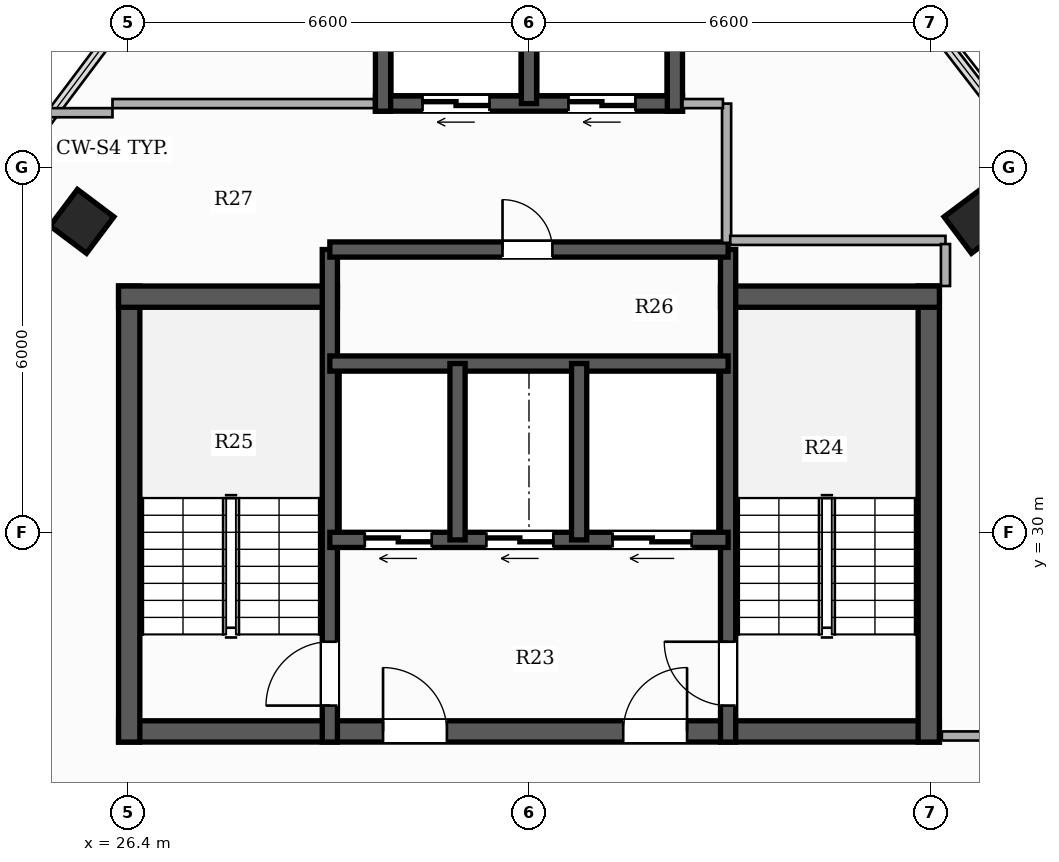
"""IFC4 building model, lengths in metres.
Left out: names, types, materials, properties, quantities, classifications, styles, units other than length and angle.
Written with IfcOpenShell. Run it as: python <this file> out.ifc"""

import sys

from ifc_helpers import new_model, si_unit, direction, frame, frame_2d, origin, origin_2d, place, context, subcontext, project, spatial, rectangle, hollow_rectangle, extrude, element, fill, save


model = new_model("IFC4")
c1 = context("Model", 3, precision=1e-05, world=origin(), true_north=direction((0.0, 1.0)))
c2 = subcontext(c1, "Body", "Model", "MODEL_VIEW")
j1 = project(units=[si_unit("LENGTHUNIT", "METRE"), si_unit("PLANEANGLEUNIT", "RADIAN")], contexts=[c1])
p1 = place(None, origin())
s1 = spatial("IfcSite", under=j1, at=p1, CompositionType="ELEMENT")
p2 = place(p1, origin())
s2 = spatial("IfcBuilding", under=s1, at=p2, CompositionType="ELEMENT")
p3 = place(p2, frame((0.0, 0.0, 253.55)))
s3 = spatial("IfcBuildingStorey", under=s2, at=p3, CompositionType="ELEMENT", Elevation=253.55)
p4 = place(p3, frame((26.25, 26.725, 0.0), z_axis=(0.0, 0.0, 1.0), x_axis=(1.0, 0.0, 0.0)))
e1 = element("IfcWall", 1, at=p4, inside=s3, PredefinedType="SHEAR", context=c2, shape_type="SweptSolid", body=[
    extrude(rectangle(XDim=13.5, YDim=0.35, at=frame_2d((6.75, 0.0))), origin(), (0.0, 0.0, 1.0), 3.3),
])
p5 = place(p4, frame((4.35, 0.0, 0.0)))
e2 = element("IfcOpeningElement", 2, at=p5, cuts=e1, PredefinedType="OPENING", context=c2, shape_type="SweptSolid", body=[
    extrude(rectangle(XDim=1.05, YDim=2.15, at=frame_2d((0.525, 1.075))), frame((0.0, 0.185, 0.0), z_axis=(0.0, -1.0, 0.0), x_axis=(1.0, 0.0, 0.0)), (0.0, 0.0, 1.0), 0.37),
])
p6 = place(p4, frame((8.3, 0.0, 0.0)))
e3 = element("IfcOpeningElement", 3, at=p6, cuts=e1, PredefinedType="OPENING", context=c2, shape_type="SweptSolid", body=[
    extrude(rectangle(XDim=1.05, YDim=2.15, at=frame_2d((0.525, 1.075))), frame((0.0, 0.185, 0.0), z_axis=(0.0, -1.0, 0.0), x_axis=(1.0, 0.0, 0.0)), (0.0, 0.0, 1.0), 0.37),
])
p7 = place(p3, frame((26.425, 26.55, 0.0), z_axis=(0.0, 0.0, 1.0), x_axis=(0.0, 1.0, 0.0)))
e4 = element("IfcWall", 4, at=p7, inside=s3, PredefinedType="SHEAR", context=c2, shape_type="SweptSolid", body=[
    extrude(rectangle(XDim=7.5, YDim=0.35, at=frame_2d((3.75, 0.0))), origin(), (0.0, 0.0, 1.0), 3.3),
])
p8 = place(p3, frame((26.25, 33.875, 0.0), z_axis=(0.0, 0.0, 1.0), x_axis=(1.0, 0.0, 0.0)))
e5 = element("IfcWall", 5, at=p8, inside=s3, PredefinedType="SHEAR", context=c2, shape_type="SweptSolid", body=[
    extrude(rectangle(XDim=3.6, YDim=0.35, at=frame_2d((1.8, 0.0))), origin(), (0.0, 0.0, 1.0), 3.3),
])
p9 = place(p3, frame((39.575, 26.55, 0.0), z_axis=(0.0, 0.0, 1.0), x_axis=(0.0, 1.0, 0.0)))
e6 = element("IfcWall", 6, at=p9, inside=s3, PredefinedType="SHEAR", context=c2, shape_type="SweptSolid", body=[
    extrude(rectangle(XDim=7.5, YDim=0.35, at=frame_2d((3.75, 0.0))), origin(), (0.0, 0.0, 1.0), 3.3),
])
p10 = place(p3, frame((36.15, 33.875, 0.0), z_axis=(0.0, 0.0, 1.0), x_axis=(1.0, 0.0, 0.0)))
e7 = element("IfcWall", 7, at=p10, inside=s3, PredefinedType="SHEAR", context=c2, shape_type="SweptSolid", body=[
    extrude(rectangle(XDim=3.6, YDim=0.35, at=frame_2d((1.8, 0.0))), origin(), (0.0, 0.0, 1.0), 3.3),
])
p11 = place(p3, frame((29.725, 26.55, 0.0), z_axis=(0.0, 0.0, 1.0), x_axis=(0.0, 1.0, 0.0)))
e8 = element("IfcWall", 8, at=p11, inside=s3, PredefinedType="SHEAR", context=c2, shape_type="SweptSolid", body=[
    extrude(rectangle(XDim=8.1, YDim=0.25, at=frame_2d((4.05, 0.0))), origin(), (0.0, 0.0, 1.0), 3.3),
])
p12 = place(p11, frame((0.6, 0.0, 0.0)))
e9 = element("IfcOpeningElement", 9, at=p12, cuts=e8, PredefinedType="OPENING", context=c2, shape_type="SweptSolid", body=[
    extrude(rectangle(XDim=1.05, YDim=2.15, at=frame_2d((0.525, 1.075))), frame((0.0, 0.135, 0.0), z_axis=(0.0, -1.0, 0.0), x_axis=(1.0, 0.0, 0.0)), (0.0, 0.0, 1.0), 0.27),
])
p13 = place(p3, frame((36.275, 26.55, 0.0), z_axis=(0.0, 0.0, 1.0), x_axis=(0.0, 1.0, 0.0)))
e10 = element("IfcWall", 10, at=p13, inside=s3, PredefinedType="SHEAR", context=c2, shape_type="SweptSolid", body=[
    extrude(rectangle(XDim=8.1, YDim=0.25, at=frame_2d((4.05, 0.0))), origin(), (0.0, 0.0, 1.0), 3.3),
])
p14 = place(p13, frame((0.6, 0.0, 0.0)))
e11 = element("IfcOpeningElement", 11, at=p14, cuts=e10, PredefinedType="OPENING", context=c2, shape_type="SweptSolid", body=[
    extrude(rectangle(XDim=1.05, YDim=2.15, at=frame_2d((0.525, 1.075))), frame((0.0, 0.135, 0.0), z_axis=(0.0, -1.0, 0.0), x_axis=(1.0, 0.0, 0.0)), (0.0, 0.0, 1.0), 0.27),
])
p15 = place(p3, frame((36.275, 29.875, 0.0), z_axis=(0.0, 0.0, 1.0), x_axis=(-1.0, 0.0, 0.0)))
e12 = element("IfcWall", 12, at=p15, inside=s3, PredefinedType="SHEAR", context=c2, shape_type="SweptSolid", body=[
    extrude(rectangle(XDim=6.55, YDim=0.25, at=frame_2d((3.275, 0.0))), origin(), (0.0, 0.0, 1.0), 3.3),
])
p16 = place(p15, frame((4.875, 0.0, 0.0)))
e13 = element("IfcOpeningElement", 13, at=p16, cuts=e12, PredefinedType="OPENING", context=c2, shape_type="SweptSolid", body=[
    extrude(rectangle(XDim=1.1, YDim=2.2, at=frame_2d((0.55, 1.1))), frame((0.0, 0.135, 0.0), z_axis=(0.0, -1.0, 0.0), x_axis=(1.0, 0.0, 0.0)), (0.0, 0.0, 1.0), 0.27),
])
p17 = place(p15, frame((2.875, 0.0, 0.0)))
e14 = element("IfcOpeningElement", 14, at=p17, cuts=e12, PredefinedType="OPENING", context=c2, shape_type="SweptSolid", body=[
    extrude(rectangle(XDim=1.1, YDim=2.2, at=frame_2d((0.55, 1.1))), frame((0.0, 0.135, 0.0), z_axis=(0.0, -1.0, 0.0), x_axis=(1.0, 0.0, 0.0)), (0.0, 0.0, 1.0), 0.27),
])
p18 = place(p15, frame((0.6, 0.0, 0.0)))
e15 = element("IfcOpeningElement", 15, at=p18, cuts=e12, PredefinedType="OPENING", context=c2, shape_type="SweptSolid", body=[
    extrude(rectangle(XDim=1.3, YDim=2.2, at=frame_2d((0.65, 1.1))), frame((0.0, 0.135, 0.0), z_axis=(0.0, -1.0, 0.0), x_axis=(1.0, 0.0, 0.0)), (0.0, 0.0, 1.0), 0.27),
])
p19 = place(p3, frame((29.725, 32.775, 0.0), z_axis=(0.0, 0.0, 1.0), x_axis=(1.0, 0.0, 0.0)))
e16 = element("IfcWall", 16, at=p19, inside=s3, PredefinedType="SHEAR", context=c2, shape_type="SweptSolid", body=[
    extrude(rectangle(XDim=6.55, YDim=0.25, at=frame_2d((3.275, 0.0))), origin(), (0.0, 0.0, 1.0), 3.3),
])
for number, where, z_axis, x_axis in (
    (17, (31.825, 29.875, 0.0), (0.0, 0.0, 1.0), (0.0, 1.0, 0.0)),
    (18, (33.825, 29.875, 0.0), (0.0, 0.0, 1.0), (0.0, 1.0, 0.0)),
):
    element("IfcWall", number, at=place(p3, frame(where, z_axis=z_axis, x_axis=x_axis)), inside=s3, PredefinedType="SHEAR", context=c2, shape_type="SweptSolid", body=[
        extrude(rectangle(XDim=2.9, YDim=0.25, at=frame_2d((1.45, 0.0))), origin(), (0.0, 0.0, 1.0), 3.3),
    ])
p20 = place(p3, frame((29.725, 34.65, 0.0), z_axis=(0.0, 0.0, 1.0), x_axis=(1.0, 0.0, 0.0)))
e19 = element("IfcWall", 19, at=p20, inside=s3, PredefinedType="SHEAR", context=c2, shape_type="SweptSolid", body=[
    extrude(rectangle(XDim=6.55, YDim=0.25, at=frame_2d((3.275, 0.0))), origin(), (0.0, 0.0, 1.0), 3.3),
])
p21 = place(p20, frame((2.84, 0.0, 0.0)))
e20 = element("IfcOpeningElement", 20, at=p21, cuts=e19, PredefinedType="OPENING", context=c2, shape_type="SweptSolid", body=[
    extrude(rectangle(XDim=0.82, YDim=2.1, at=frame_2d((0.41, 1.05))), frame((0.0, 0.135, 0.0), z_axis=(0.0, -1.0, 0.0), x_axis=(1.0, 0.0, 0.0)), (0.0, 0.0, 1.0), 0.27),
])
p22 = place(p3, frame((35.525, 37.05, 0.0), z_axis=(0.0, 0.0, 1.0), x_axis=(-1.0, 0.0, 0.0)))
e21 = element("IfcWall", 21, at=p22, inside=s3, PredefinedType="SHEAR", context=c2, shape_type="SweptSolid", body=[
    extrude(rectangle(XDim=5.05, YDim=0.25, at=frame_2d((2.525, 0.0))), origin(), (0.0, 0.0, 1.0), 3.3),
])
p23 = place(p22, frame((3.175, 0.0, 0.0)))
e22 = element("IfcOpeningElement", 22, at=p23, cuts=e21, PredefinedType="OPENING", context=c2, shape_type="SweptSolid", body=[
    extrude(rectangle(XDim=1.1, YDim=2.2, at=frame_2d((0.55, 1.1))), frame((0.0, 0.135, 0.0), z_axis=(0.0, -1.0, 0.0), x_axis=(1.0, 0.0, 0.0)), (0.0, 0.0, 1.0), 0.27),
])
p24 = place(p22, frame((0.775, 0.0, 0.0)))
e23 = element("IfcOpeningElement", 23, at=p24, cuts=e21, PredefinedType="OPENING", context=c2, shape_type="SweptSolid", body=[
    extrude(rectangle(XDim=1.1, YDim=2.2, at=frame_2d((0.55, 1.1))), frame((0.0, 0.135, 0.0), z_axis=(0.0, -1.0, 0.0), x_axis=(1.0, 0.0, 0.0)), (0.0, 0.0, 1.0), 0.27),
])
for number, where, z_axis, x_axis in (
    (24, (30.6, 36.925, 0.0), (0.0, 0.0, 1.0), (0.0, 1.0, 0.0)),
    (25, (35.4, 36.925, 0.0), (0.0, 0.0, 1.0), (0.0, 1.0, 0.0)),
):
    element("IfcWall", number, at=place(p3, frame(where, z_axis=z_axis, x_axis=x_axis)), inside=s3, PredefinedType="SHEAR", context=c2, shape_type="SweptSolid", body=[
        extrude(rectangle(XDim=2.8, YDim=0.25, at=frame_2d((1.4, 0.0))), origin(), (0.0, 0.0, 1.0), 3.3),
    ])
p25 = place(p3, frame((33.0, 37.05, 0.0), z_axis=(0.0, 0.0, 1.0), x_axis=(0.0, 1.0, 0.0)))
e26 = element("IfcWall", 26, at=p25, inside=s3, PredefinedType="SHEAR", context=c2, shape_type="SweptSolid", body=[
    extrude(rectangle(XDim=2.55, YDim=0.25, at=frame_2d((1.275, 0.0))), origin(), (0.0, 0.0, 1.0), 3.3),
])
for number, where, z_axis, x_axis in (
    (27, (25.648, 35.113, 0.0), (0.0, 0.0, 1.0), (0.6, 0.8, 0.0)),
    (28, (40.352, 35.113, 0.0), (0.0, 0.0, 1.0), (-0.6, 0.8, 0.0)),
):
    element("IfcColumn", number, at=place(p3, frame(where, z_axis=z_axis, x_axis=x_axis)), inside=s3, PredefinedType="COLUMN", context=c2, shape_type="SweptSolid", body=[
        extrude(hollow_rectangle(XDim=0.75, YDim=0.75, WallThickness=0.025, at=origin_2d()), origin(), (0.0, 0.0, 1.0), 3.3),
    ])
p26 = place(p3, frame((36.25, 34.76, 0.0), z_axis=(0.0, 0.0, 1.0), x_axis=(0.0, 1.0, 0.0)))
e29 = element("IfcWall", 29, at=p26, inside=s3, PredefinedType="PARTITIONING", context=c2, shape_type="SweptSolid", body=[
    extrude(rectangle(XDim=2.29, YDim=0.15, at=frame_2d((1.145, 0.0))), origin(), (0.0, 0.0, 1.0), 2.265),
])
p27 = place(p3, frame((35.525, 37.05, 0.0), z_axis=(0.0, 0.0, 1.0), x_axis=(1.0, 0.0, 0.0)))
e30 = element("IfcWall", 30, at=p27, inside=s3, PredefinedType="PARTITIONING", context=c2, shape_type="SweptSolid", body=[
    extrude(rectangle(XDim=0.665, YDim=0.15, at=frame_2d((0.333, 0.0))), origin(), (0.0, 0.0, 1.0), 2.265),
])
p28 = place(p3, frame((25.058, 36.9, 0.0), z_axis=(0.0, 0.0, 1.0), x_axis=(1.0, 0.0, 0.0)))
e31 = element("IfcWall", 31, at=p28, inside=s3, PredefinedType="PARTITIONING", context=c2, shape_type="SweptSolid", body=[
    extrude(rectangle(XDim=1.092, YDim=0.15, at=frame_2d((0.546, 0.0))), origin(), (0.0, 0.0, 1.0), 2.9),
])
p29 = place(p3, frame((39.79, 26.65, 0.0), z_axis=(0.0, 0.0, 1.0), x_axis=(1.0, 0.0, 0.0)))
e32 = element("IfcWall", 32, at=p29, inside=s3, PredefinedType="PARTITIONING", context=c2, shape_type="SweptSolid", body=[
    extrude(rectangle(XDim=2.46, YDim=0.15, at=frame_2d((1.23, 0.0))), origin(), (0.0, 0.0, 1.0), 2.405),
])
p30 = place(p3, frame((26.15, 37.05, 0.0), z_axis=(0.0, 0.0, 1.0), x_axis=(1.0, 0.0, 0.0)))
e33 = element("IfcWall", 33, at=p30, inside=s3, PredefinedType="PARTITIONING", context=c2, shape_type="SweptSolid", body=[
    extrude(rectangle(XDim=4.3, YDim=0.15, at=frame_2d((2.15, 0.0))), origin(), (0.0, 0.0, 1.0), 2.265),
])
p31 = place(p3, frame((36.31, 34.8, 0.0), z_axis=(0.0, 0.0, 1.0), x_axis=(1.0, 0.0, 0.0)))
e34 = element("IfcWall", 34, at=p31, inside=s3, PredefinedType="PARTITIONING", context=c2, shape_type="SweptSolid", body=[
    extrude(rectangle(XDim=3.54, YDim=0.15, at=frame_2d((1.77, 0.0))), origin(), (0.0, 0.0, 1.0), 2.265),
])
p32 = place(p3, frame((39.85, 34.74, 0.0), z_axis=(0.0, 0.0, 1.0), x_axis=(0.0, -1.0, 0.0)))
e35 = element("IfcWall", 35, at=p32, inside=s3, PredefinedType="PARTITIONING", context=c2, shape_type="SweptSolid", body=[
    extrude(rectangle(XDim=0.69, YDim=0.15, at=frame_2d((0.345, 0.0))), origin(), (0.0, 0.0, 1.0), 2.613),
])
p33 = place(p12, origin())
e36 = element("IfcDoor", 36, at=p33, inside=s3, OperationType="SINGLE_SWING_LEFT", PredefinedType="DOOR", context=c2, shape_type="SweptSolid", body=[
    extrude(rectangle(XDim=1.05, YDim=2.15, at=frame_2d((0.525, 1.075))), frame((0.0, 0.025, 0.0), z_axis=(0.0, -1.0, 0.0), x_axis=(1.0, 0.0, 0.0)), (0.0, 0.0, 1.0), 0.05),
])
fill(e9, e36)
p34 = place(p14, origin())
e37 = element("IfcDoor", 37, at=p34, inside=s3, OperationType="SINGLE_SWING_RIGHT", PredefinedType="DOOR", context=c2, shape_type="SweptSolid", body=[
    extrude(rectangle(XDim=1.05, YDim=2.15, at=frame_2d((0.525, 1.075))), frame((0.0, 0.025, 0.0), z_axis=(0.0, -1.0, 0.0), x_axis=(1.0, 0.0, 0.0)), (0.0, 0.0, 1.0), 0.05),
])
fill(e11, e37)
p35 = place(p5, origin())
e38 = element("IfcDoor", 38, at=p35, inside=s3, OperationType="SINGLE_SWING_LEFT", PredefinedType="DOOR", context=c2, shape_type="SweptSolid", body=[
    extrude(rectangle(XDim=1.05, YDim=2.15, at=frame_2d((0.525, 1.075))), frame((0.0, 0.025, 0.0), z_axis=(0.0, -1.0, 0.0), x_axis=(1.0, 0.0, 0.0)), (0.0, 0.0, 1.0), 0.05),
])
fill(e2, e38)
p36 = place(p6, origin())
e39 = element("IfcDoor", 39, at=p36, inside=s3, OperationType="SINGLE_SWING_RIGHT", PredefinedType="DOOR", context=c2, shape_type="SweptSolid", body=[
    extrude(rectangle(XDim=1.05, YDim=2.15, at=frame_2d((0.525, 1.075))), frame((0.0, 0.025, 0.0), z_axis=(0.0, -1.0, 0.0), x_axis=(1.0, 0.0, 0.0)), (0.0, 0.0, 1.0), 0.05),
])
fill(e3, e39)
p37 = place(p16, origin())
e40 = element("IfcDoor", 40, at=p37, inside=s3, OperationType="DOUBLE_DOOR_SLIDING", PredefinedType="DOOR", context=c2, shape_type="SweptSolid", body=[
    extrude(rectangle(XDim=1.1, YDim=2.2, at=frame_2d((0.55, 1.1))), frame((0.0, 0.025, 0.0), z_axis=(0.0, -1.0, 0.0), x_axis=(1.0, 0.0, 0.0)), (0.0, 0.0, 1.0), 0.05),
])
fill(e13, e40)
p38 = place(p17, origin())
e41 = element("IfcDoor", 41, at=p38, inside=s3, OperationType="DOUBLE_DOOR_SLIDING", PredefinedType="DOOR", context=c2, shape_type="SweptSolid", body=[
    extrude(rectangle(XDim=1.1, YDim=2.2, at=frame_2d((0.55, 1.1))), frame((0.0, 0.025, 0.0), z_axis=(0.0, -1.0, 0.0), x_axis=(1.0, 0.0, 0.0)), (0.0, 0.0, 1.0), 0.05),
])
fill(e14, e41)
p39 = place(p18, origin())
e42 = element("IfcDoor", 42, at=p39, inside=s3, OperationType="DOUBLE_DOOR_SLIDING", PredefinedType="DOOR", context=c2, shape_type="SweptSolid", body=[
    extrude(rectangle(XDim=1.3, YDim=2.2, at=frame_2d((0.65, 1.1))), frame((0.0, 0.025, 0.0), z_axis=(0.0, -1.0, 0.0), x_axis=(1.0, 0.0, 0.0)), (0.0, 0.0, 1.0), 0.05),
])
fill(e15, e42)
p40 = place(p23, origin())
e43 = element("IfcDoor", 43, at=p40, inside=s3, OperationType="DOUBLE_DOOR_SLIDING", PredefinedType="DOOR", context=c2, shape_type="SweptSolid", body=[
    extrude(rectangle(XDim=1.1, YDim=2.2, at=frame_2d((0.55, 1.1))), frame((0.0, 0.025, 0.0), z_axis=(0.0, -1.0, 0.0), x_axis=(1.0, 0.0, 0.0)), (0.0, 0.0, 1.0), 0.05),
])
fill(e22, e43)
p41 = place(p24, origin())
e44 = element("IfcDoor", 44, at=p41, inside=s3, OperationType="DOUBLE_DOOR_SLIDING", PredefinedType="DOOR", context=c2, shape_type="SweptSolid", body=[
    extrude(rectangle(XDim=1.1, YDim=2.2, at=frame_2d((0.55, 1.1))), frame((0.0, 0.025, 0.0), z_axis=(0.0, -1.0, 0.0), x_axis=(1.0, 0.0, 0.0)), (0.0, 0.0, 1.0), 0.05),
])
fill(e23, e44)
p42 = place(p21, origin())
e45 = element("IfcDoor", 45, at=p42, inside=s3, OperationType="SINGLE_SWING_LEFT", PredefinedType="DOOR", context=c2, shape_type="SweptSolid", body=[
    extrude(rectangle(XDim=0.82, YDim=2.1, at=frame_2d((0.41, 1.05))), frame((0.0, 0.025, 0.0), z_axis=(0.0, -1.0, 0.0), x_axis=(1.0, 0.0, 0.0)), (0.0, 0.0, 1.0), 0.05),
])
fill(e20, e45)
save(model, sys.argv[1])
